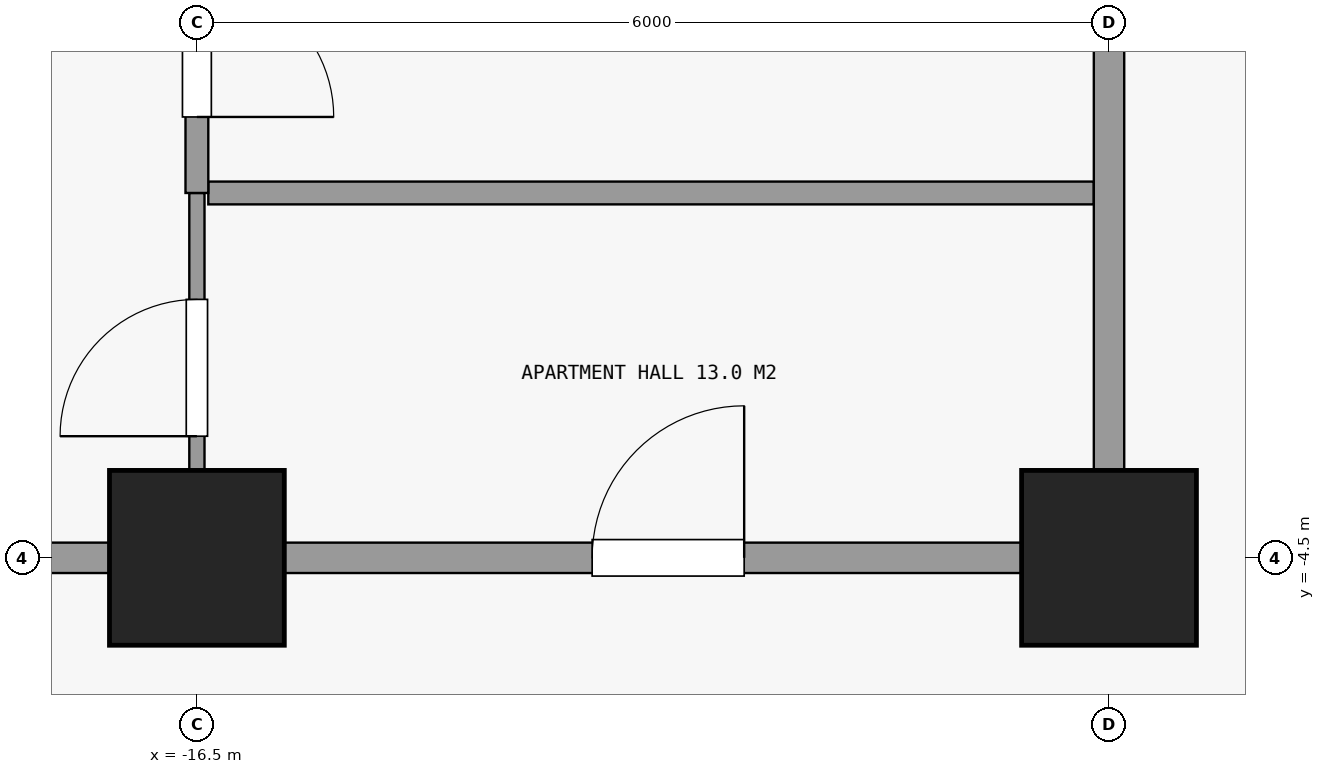
"""IFC4 building model, lengths in metres.
Left out: names, types, materials, properties, quantities, classifications, styles, units other than length and angle.
Written with IfcOpenShell. Run it as: python <this file> out.ifc"""

import sys

from ifc_helpers import new_model, si_unit, direction, frame, frame_2d, origin, origin_2d, place, context, subcontext, project, spatial, rectangle, extrude, element, fill, save


model = new_model("IFC4")
c1 = context("Model", 3, precision=1e-05, world=origin(), true_north=direction((0.0, 1.0)))
c2 = subcontext(c1, "Body", "Model", "MODEL_VIEW")
j1 = project(units=[si_unit("LENGTHUNIT", "METRE"), si_unit("PLANEANGLEUNIT", "RADIAN")], contexts=[c1])
p1 = place(None, origin())
s1 = spatial("IfcSite", under=j1, at=p1, CompositionType="ELEMENT")
p2 = place(p1, origin())
s2 = spatial("IfcBuilding", under=s1, at=p2, CompositionType="ELEMENT")
p3 = place(p2, frame((0.0, 0.0, 113.5)))
s3 = spatial("IfcBuildingStorey", under=s2, at=p3, CompositionType="ELEMENT", Elevation=113.5)
for number, where, z_axis, x_axis in (
    (1, (-16.5, -4.5, 0.0), (0.0, 0.0, 1.0), (1.0, 0.0, 0.0)),
    (2, (-10.5, -4.5, 0.0), (0.0, 0.0, 1.0), (1.0, 0.0, 0.0)),
):
    element("IfcColumn", number, at=place(p3, frame(where, z_axis=z_axis, x_axis=x_axis)), inside=s3, PredefinedType="COLUMN", context=c2, shape_type="SweptSolid", body=[
        extrude(rectangle(XDim=1.15, YDim=1.15, at=origin_2d()), origin(), (0.0, 0.0, 1.0), 3.6),
    ])
p4 = place(p3, frame((-23.85, -4.5, 0.0), z_axis=(0.0, 0.0, 1.0), x_axis=(1.0, 0.0, 0.0)))
e3 = element("IfcWall", 3, at=p4, inside=s3, PredefinedType="PARTITIONING", context=c2, shape_type="SweptSolid", body=[
    extrude(rectangle(XDim=13.45, YDim=0.2, at=frame_2d((6.725, 0.0))), origin(), (0.0, 0.0, 1.0), 3.3),
])
p5 = place(p4, frame((9.95, 0.0, 0.0)))
e4 = element("IfcOpeningElement", 4, at=p5, cuts=e3, PredefinedType="OPENING", context=c2, shape_type="SweptSolid", body=[
    extrude(rectangle(XDim=1.0, YDim=2.1, at=frame_2d((0.5, 1.05))), frame((0.0, 0.11, 0.0), z_axis=(0.0, -1.0, 0.0), x_axis=(1.0, 0.0, 0.0)), (0.0, 0.0, 1.0), 0.22),
])
p6 = place(p3, frame((-16.425, -2.1, 0.0), z_axis=(0.0, 0.0, 1.0), x_axis=(1.0, 0.0, 0.0)))
e5 = element("IfcWall", 5, at=p6, inside=s3, PredefinedType="PARTITIONING", context=c2, shape_type="SweptSolid", body=[
    extrude(rectangle(XDim=5.825, YDim=0.15, at=frame_2d((2.913, 0.0))), origin(), (0.0, 0.0, 1.0), 3.3),
])
p7 = place(p3, frame((-16.5, -4.4, 0.0), z_axis=(0.0, 0.0, 1.0), x_axis=(0.0, 1.0, 0.0)))
e6 = element("IfcWall", 6, at=p7, inside=s3, PredefinedType="PARTITIONING", context=c2, shape_type="SweptSolid", body=[
    extrude(rectangle(XDim=2.3, YDim=0.1, at=frame_2d((1.15, 0.0))), origin(), (0.0, 0.0, 1.0), 3.3),
])
p8 = place(p7, frame((0.7, 0.0, 0.0)))
e7 = element("IfcOpeningElement", 7, at=p8, cuts=e6, PredefinedType="OPENING", context=c2, shape_type="SweptSolid", body=[
    extrude(rectangle(XDim=0.9, YDim=2.1, at=frame_2d((0.45, 1.05))), frame((0.0, 0.06, 0.0), z_axis=(0.0, -1.0, 0.0), x_axis=(1.0, 0.0, 0.0)), (0.0, 0.0, 1.0), 0.12),
])
p9 = place(p3, frame((-16.5, -2.1, 0.0), z_axis=(0.0, 0.0, 1.0), x_axis=(0.0, 1.0, 0.0)))
e8 = element("IfcWall", 8, at=p9, inside=s3, PredefinedType="PARTITIONING", context=c2, shape_type="SweptSolid", body=[
    extrude(rectangle(XDim=1.925, YDim=0.15, at=frame_2d((0.962, 0.0))), origin(), (0.0, 0.0, 1.0), 3.3),
])
p10 = place(p9, frame((0.5, 0.0, 0.0)))
e9 = element("IfcOpeningElement", 9, at=p10, cuts=e8, PredefinedType="OPENING", context=c2, shape_type="SweptSolid", body=[
    extrude(rectangle(XDim=0.9, YDim=2.1, at=frame_2d((0.45, 1.05))), frame((0.0, 0.085, 0.0), z_axis=(0.0, -1.0, 0.0), x_axis=(1.0, 0.0, 0.0)), (0.0, 0.0, 1.0), 0.17),
])
p11 = place(p3, frame((-10.5, -4.4, 0.0), z_axis=(0.0, 0.0, 1.0), x_axis=(0.0, 1.0, 0.0)))
e10 = element("IfcWall", 10, at=p11, inside=s3, PredefinedType="PARTITIONING", context=c2, shape_type="SweptSolid", body=[
    extrude(rectangle(XDim=11.8, YDim=0.2, at=frame_2d((5.9, 0.0))), origin(), (0.0, 0.0, 1.0), 3.3),
])
p12 = place(p11, frame((6.6, 0.0, 0.0)))
e11 = element("IfcOpeningElement", 11, at=p12, cuts=e10, PredefinedType="OPENING", context=c2, shape_type="SweptSolid", body=[
    extrude(rectangle(XDim=1.0, YDim=2.1, at=frame_2d((0.5, 1.05))), frame((0.0, 0.11, 0.0), z_axis=(0.0, -1.0, 0.0), x_axis=(1.0, 0.0, 0.0)), (0.0, 0.0, 1.0), 0.22),
])
p13 = place(p5, origin())
e12 = element("IfcDoor", 12, at=p13, inside=s3, OperationType="SINGLE_SWING_LEFT", PredefinedType="DOOR", context=c2, shape_type="SweptSolid", body=[
    extrude(rectangle(XDim=1.0, YDim=2.1, at=frame_2d((0.5, 1.05))), frame((0.0, 0.025, 0.0), z_axis=(0.0, -1.0, 0.0), x_axis=(1.0, 0.0, 0.0)), (0.0, 0.0, 1.0), 0.05),
])
fill(e4, e12)
p14 = place(p8, origin())
e13 = element("IfcDoor", 13, at=p14, inside=s3, OperationType="SINGLE_SWING_RIGHT", PredefinedType="DOOR", context=c2, shape_type="SweptSolid", body=[
    extrude(rectangle(XDim=0.9, YDim=2.1, at=frame_2d((0.45, 1.05))), frame((0.0, 0.025, 0.0), z_axis=(0.0, -1.0, 0.0), x_axis=(1.0, 0.0, 0.0)), (0.0, 0.0, 1.0), 0.05),
])
fill(e7, e13)
p15 = place(p10, origin())
e14 = element("IfcDoor", 14, at=p15, inside=s3, OperationType="SINGLE_SWING_LEFT", PredefinedType="DOOR", context=c2, shape_type="SweptSolid", body=[
    extrude(rectangle(XDim=0.9, YDim=2.1, at=frame_2d((0.45, 1.05))), frame((0.0, 0.025, 0.0), z_axis=(0.0, -1.0, 0.0), x_axis=(1.0, 0.0, 0.0)), (0.0, 0.0, 1.0), 0.05),
])
fill(e9, e14)
save(model, sys.argv[1])
